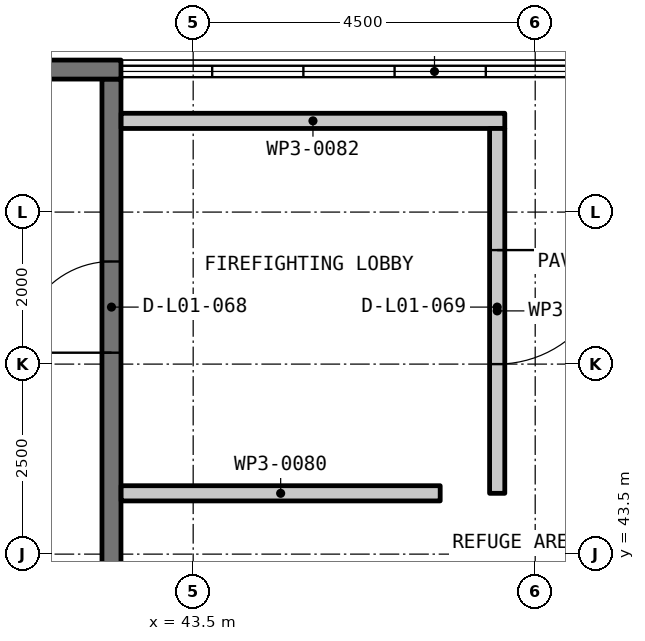
"""IFC4 building model, lengths in metres.
Left out: names, types, materials, properties, quantities, classifications, styles, units other than length and angle.
Written with IfcOpenShell. Run it as: python <this file> out.ifc"""

import sys

from ifc_helpers import new_model, si_unit, direction, frame, frame_2d, origin, place, context, subcontext, project, spatial, rectangle, extrude, element, fill, save


model = new_model("IFC4")
c1 = context("Model", 3, precision=1e-05, world=origin(), true_north=direction((0.0, 1.0)))
c2 = subcontext(c1, "Body", "Model", "MODEL_VIEW")
j1 = project(units=[si_unit("LENGTHUNIT", "METRE"), si_unit("PLANEANGLEUNIT", "RADIAN")], contexts=[c1])
p1 = place(None, origin())
s1 = spatial("IfcSite", under=j1, at=p1, CompositionType="ELEMENT")
p2 = place(p1, origin())
s2 = spatial("IfcBuilding", under=s1, at=p2, CompositionType="ELEMENT")
p3 = place(p2, frame((0.0, 0.0, 6.0)))
s3 = spatial("IfcBuildingStorey", under=s2, at=p3, CompositionType="ELEMENT", Elevation=6.0)
p4 = place(p3, frame((42.425, 36.25, -0.3), z_axis=(0.0, 0.0, 1.0), x_axis=(0.0, 1.0, 0.0)))
e1 = element("IfcWall", 1, at=p4, inside=s3, PredefinedType="SHEAR", context=c2, shape_type="SweptSolid", body=[
    extrude(rectangle(XDim=13.5, YDim=0.25, at=frame_2d((6.75, 0.0))), origin(), (0.0, 0.0, 1.0), 5.25),
])
p5 = place(p4, frame((9.9, 0.0, 0.3)))
e2 = element("IfcOpeningElement", 2, at=p5, cuts=e1, PredefinedType="OPENING", context=c2, shape_type="SweptSolid", body=[
    extrude(rectangle(XDim=1.2, YDim=2.2, at=frame_2d((0.6, 1.1))), frame((0.0, 0.135, 0.0), z_axis=(0.0, -1.0, 0.0), x_axis=(1.0, 0.0, 0.0)), (0.0, 0.0, 1.0), 0.27),
])
p6 = place(p3, frame((36.0, 49.875, -0.3), z_axis=(0.0, 0.0, 1.0), x_axis=(1.0, 0.0, 0.0)))
e3 = element("IfcWall", 3, at=p6, inside=s3, PredefinedType="SHEAR", context=c2, shape_type="SweptSolid", body=[
    extrude(rectangle(XDim=6.55, YDim=0.25, at=frame_2d((3.275, 0.0))), origin(), (0.0, 0.0, 1.0), 5.25),
])
p7 = place(p3, frame((42.552, 44.3, 0.0), z_axis=(0.0, 0.0, 1.0), x_axis=(1.0, 0.0, 0.0)))
e4 = element("IfcWall", 4, at=p7, inside=s3, PredefinedType="PARTITIONING", context=c2, shape_type="SweptSolid", body=[
    extrude(rectangle(XDim=4.198, YDim=0.2, at=frame_2d((2.099, 0.0))), origin(), (0.0, 0.0, 1.0), 4.95),
])
p8 = place(p3, frame((42.552, 49.2, 0.0), z_axis=(0.0, 0.0, 1.0), x_axis=(1.0, 0.0, 0.0)))
e5 = element("IfcWall", 5, at=p8, inside=s3, PredefinedType="PARTITIONING", context=c2, shape_type="SweptSolid", body=[
    extrude(rectangle(XDim=5.048, YDim=0.2, at=frame_2d((2.524, 0.0))), origin(), (0.0, 0.0, 1.0), 4.95),
])
p9 = place(p3, frame((47.5, 49.1, 0.0), z_axis=(0.0, 0.0, 1.0), x_axis=(0.0, -1.0, 0.0)))
e6 = element("IfcWall", 6, at=p9, inside=s3, PredefinedType="PARTITIONING", context=c2, shape_type="SweptSolid", body=[
    extrude(rectangle(XDim=4.8, YDim=0.2, at=frame_2d((2.4, 0.0))), origin(), (0.0, 0.0, 1.0), 4.95),
])
p10 = place(p9, frame((1.6, 0.0, 0.0)))
e7 = element("IfcOpeningElement", 7, at=p10, cuts=e6, PredefinedType="OPENING", context=c2, shape_type="SweptSolid", body=[
    extrude(rectangle(XDim=1.5, YDim=2.1, at=frame_2d((0.75, 1.05))), frame((0.0, 0.11, 0.0), z_axis=(0.0, -1.0, 0.0), x_axis=(1.0, 0.0, 0.0)), (0.0, 0.0, 1.0), 0.22),
])
p11 = place(p5, origin())
e8 = element("IfcDoor", 8, at=p11, inside=s3, OperationType="SINGLE_SWING_LEFT", PredefinedType="DOOR", context=c2, shape_type="SweptSolid", body=[
    extrude(rectangle(XDim=1.2, YDim=2.2, at=frame_2d((0.6, 1.1))), frame((0.0, 0.025, 0.0), z_axis=(0.0, -1.0, 0.0), x_axis=(1.0, 0.0, 0.0)), (0.0, 0.0, 1.0), 0.05),
])
fill(e2, e8)
p12 = place(p10, origin())
e9 = element("IfcDoor", 9, at=p12, inside=s3, OperationType="DOUBLE_DOOR_SINGLE_SWING", PredefinedType="DOOR", context=c2, shape_type="SweptSolid", body=[
    extrude(rectangle(XDim=1.5, YDim=2.1, at=frame_2d((0.75, 1.05))), frame((0.0, 0.025, 0.0), z_axis=(0.0, -1.0, 0.0), x_axis=(1.0, 0.0, 0.0)), (0.0, 0.0, 1.0), 0.05),
])
fill(e7, e9)
save(model, sys.argv[1])
